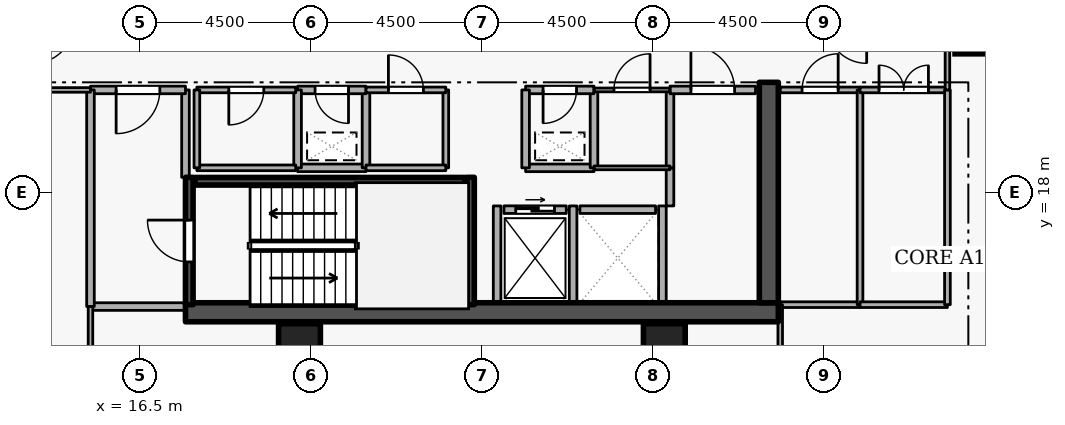
"""IFC4 building model, lengths in metres.
Left out: names, types, materials, properties, quantities, classifications, styles, units other than length and angle.
Written with IfcOpenShell. Run it as: python <this file> out.ifc"""

import sys

from ifc_helpers import new_model, si_unit, direction, frame, frame_2d, origin, origin_2d, place, context, subcontext, project, spatial, rectangle, extrude, element, fill, save


model = new_model("IFC4")
c1 = context("Model", 3, precision=1e-05, world=origin(), true_north=direction((0.0, 1.0)))
c2 = subcontext(c1, "Body", "Model", "MODEL_VIEW")
j1 = project(units=[si_unit("LENGTHUNIT", "METRE"), si_unit("PLANEANGLEUNIT", "RADIAN")], contexts=[c1])
p1 = place(None, origin())
s1 = spatial("IfcSite", under=j1, at=p1, CompositionType="ELEMENT")
p2 = place(p1, origin())
s2 = spatial("IfcBuilding", under=s1, at=p2, CompositionType="ELEMENT")
p3 = place(p2, frame((0.0, 0.0, 163.5)))
s3 = spatial("IfcBuildingStorey", under=s2, at=p3, CompositionType="ELEMENT", Elevation=163.5)
p4 = place(p3, frame((17.7, 14.85, 0.0), z_axis=(0.0, 0.0, 1.0), x_axis=(1.0, 0.0, 0.0)))
e1 = element("IfcWall", 1, at=p4, inside=s3, PredefinedType="SHEAR", context=c2, shape_type="SweptSolid", body=[
    extrude(rectangle(XDim=15.6, YDim=0.5, at=frame_2d((7.8, 0.0))), origin(), (0.0, 0.0, 1.0), 3.6),
])
p5 = place(p3, frame((33.05, 15.1, 0.0), z_axis=(0.0, 0.0, 1.0), x_axis=(0.0, 1.0, 0.0)))
e2 = element("IfcWall", 2, at=p5, inside=s3, PredefinedType="SHEAR", context=c2, shape_type="SweptSolid", body=[
    extrude(rectangle(XDim=5.8, YDim=0.5, at=frame_2d((2.9, 0.0))), origin(), (0.0, 0.0, 1.0), 3.6),
])
for number, where, z_axis, x_axis in (
    (3, (38.5, 22.2, 0.0), (0.0, 0.0, 1.0), (1.0, 0.0, 0.0)),
    (4, (20.7, 14.0, 0.0), (0.0, 0.0, 1.0), (1.0, 0.0, 0.0)),
    (5, (30.3, 14.0, 0.0), (0.0, 0.0, 1.0), (1.0, 0.0, 0.0)),
):
    element("IfcColumn", number, at=place(p3, frame(where, z_axis=z_axis, x_axis=x_axis)), inside=s3, PredefinedType="COLUMN", context=c2, shape_type="SweptSolid", body=[
        extrude(rectangle(XDim=1.1, YDim=1.1, at=origin_2d()), origin(), (0.0, 0.0, 1.0), 3.6),
    ])
p6 = place(p3, frame((26.08, 17.55, 0.0), z_axis=(0.0, 0.0, 1.0), x_axis=(1.0, 0.0, 0.0)))
e6 = element("IfcWall", 6, at=p6, inside=s3, PredefinedType="STANDARD", context=c2, shape_type="SweptSolid", body=[
    extrude(rectangle(XDim=1.64, YDim=0.2, at=frame_2d((0.82, 0.0))), origin(), (0.0, 0.0, 1.0), 3.34),
])
p7 = place(p6, frame((0.31, 0.0, 0.0)))
e7 = element("IfcOpeningElement", 7, at=p7, cuts=e6, PredefinedType="OPENING", context=c2, shape_type="SweptSolid", body=[
    extrude(rectangle(XDim=1.02, YDim=2.06, at=frame_2d((0.51, 1.03))), frame((0.0, 0.11, 0.0), z_axis=(0.0, -1.0, 0.0), x_axis=(1.0, 0.0, 0.0)), (0.0, 0.0, 1.0), 0.22),
])
p8 = place(p3, frame((28.08, 17.55, 0.0), z_axis=(0.0, 0.0, 1.0), x_axis=(1.0, 0.0, 0.0)))
e8 = element("IfcWall", 8, at=p8, inside=s3, PredefinedType="STANDARD", context=c2, shape_type="SweptSolid", body=[
    extrude(rectangle(XDim=1.99, YDim=0.2, at=frame_2d((0.995, 0.0))), origin(), (0.0, 0.0, 1.0), 3.34),
])
for number, where, z_axis, x_axis in (
    (9, (27.9, 15.112, 0.0), (0.0, 0.0, 1.0), (0.0, 1.0, 0.0)),
    (10, (25.9, 15.112, 0.0), (0.0, 0.0, 1.0), (0.0, 1.0, 0.0)),
    (11, (30.25, 15.112, 0.0), (0.0, 0.0, 1.0), (0.0, 1.0, 0.0)),
):
    element("IfcWall", number, at=place(p3, frame(where, z_axis=z_axis, x_axis=x_axis)), inside=s3, PredefinedType="STANDARD", context=c2, shape_type="SweptSolid", body=[
        extrude(rectangle(XDim=2.536, YDim=0.2, at=frame_2d((1.268, 0.0))), origin(), (0.0, 0.0, 1.0), 3.34),
    ])
p9 = place(p3, frame((17.8, 15.05, 0.0), z_axis=(0.0, 0.0, 1.0), x_axis=(0.0, 1.0, 0.0)))
e12 = element("IfcWall", 12, at=p9, inside=s3, PredefinedType="SHEAR", context=c2, shape_type="SweptSolid", body=[
    extrude(rectangle(XDim=3.35, YDim=0.2, at=frame_2d((1.675, 0.0))), origin(), (0.0, 0.0, 1.0), 3.6),
])
p10 = place(p9, frame((1.125, 0.0, 0.0)))
e13 = element("IfcOpeningElement", 13, at=p10, cuts=e12, PredefinedType="OPENING", context=c2, shape_type="SweptSolid", body=[
    extrude(rectangle(XDim=1.1, YDim=2.1, at=frame_2d((0.55, 1.05))), frame((0.0, 0.11, 0.0), z_axis=(0.0, -1.0, 0.0), x_axis=(1.0, 0.0, 0.0)), (0.0, 0.0, 1.0), 0.22),
])
p11 = place(p3, frame((25.2, 18.4, 0.0), z_axis=(0.0, 0.0, 1.0), x_axis=(0.0, -1.0, 0.0)))
e14 = element("IfcWall", 14, at=p11, inside=s3, PredefinedType="SHEAR", context=c2, shape_type="SweptSolid", body=[
    extrude(rectangle(XDim=3.35, YDim=0.2, at=frame_2d((1.675, 0.0))), origin(), (0.0, 0.0, 1.0), 3.6),
])
p12 = place(p3, frame((25.05, 18.297, 0.0), z_axis=(0.0, 0.0, 1.0), x_axis=(-1.0, 0.0, 0.0)))
e15 = element("IfcWall", 15, at=p12, inside=s3, PredefinedType="SHEAR", context=c2, shape_type="SweptSolid", body=[
    extrude(rectangle(XDim=7.1, YDim=0.2, at=frame_2d((3.55, 0.0))), origin(), (0.0, 0.0, 1.0), 3.6),
])
p13 = place(p3, frame((15.2, 15.0, 0.0), z_axis=(0.0, 0.0, 1.0), x_axis=(1.0, 0.0, 0.0)))
e16 = element("IfcWall", 16, at=p13, inside=s3, PredefinedType="STANDARD", context=c2, shape_type="SweptSolid", body=[
    extrude(rectangle(XDim=2.5, YDim=0.2, at=frame_2d((1.25, 0.0))), origin(), (0.0, 0.0, 1.0), 3.34),
])
p14 = place(p3, frame((17.7, 18.4, 0.0), z_axis=(0.0, 0.0, 1.0), x_axis=(0.0, 1.0, 0.0)))
e17 = element("IfcWall", 17, at=p14, inside=s3, PredefinedType="STANDARD", context=c2, shape_type="SweptSolid", body=[
    extrude(rectangle(XDim=2.3, YDim=0.2, at=frame_2d((1.15, 0.0))), origin(), (0.0, 0.0, 1.0), 2.545),
])
p15 = place(p3, frame((17.7, 20.7, 0.0), z_axis=(0.0, 0.0, 1.0), x_axis=(-1.0, 0.0, 0.0)))
e18 = element("IfcWall", 18, at=p15, inside=s3, PredefinedType="STANDARD", context=c2, shape_type="SweptSolid", body=[
    extrude(rectangle(XDim=2.5, YDim=0.2, at=frame_2d((1.25, 0.0))), origin(), (0.0, 0.0, 1.0), 3.34),
])
p16 = place(p15, frame((0.675, 0.0, 0.0)))
e19 = element("IfcOpeningElement", 19, at=p16, cuts=e18, PredefinedType="OPENING", context=c2, shape_type="SweptSolid", body=[
    extrude(rectangle(XDim=1.15, YDim=2.1, at=frame_2d((0.575, 1.05))), frame((0.0, 0.11, 0.0), z_axis=(0.0, -1.0, 0.0), x_axis=(1.0, 0.0, 0.0)), (0.0, 0.0, 1.0), 0.22),
])
p17 = place(p3, frame((15.2, 20.7, 0.0), z_axis=(0.0, 0.0, 1.0), x_axis=(0.0, -1.0, 0.0)))
e20 = element("IfcWall", 20, at=p17, inside=s3, PredefinedType="STANDARD", context=c2, shape_type="SweptSolid", body=[
    extrude(rectangle(XDim=5.7, YDim=0.2, at=frame_2d((2.85, 0.0))), origin(), (0.0, 0.0, 1.0), 3.34),
])
p18 = place(p3, frame((26.65, 18.65, 0.0), z_axis=(0.0, 0.0, 1.0), x_axis=(1.0, 0.0, 0.0)))
e21 = element("IfcWall", 21, at=p18, inside=s3, PredefinedType="STANDARD", context=c2, shape_type="SweptSolid", body=[
    extrude(rectangle(XDim=1.8, YDim=0.2, at=frame_2d((0.9, 0.0))), origin(), (0.0, 0.0, 1.0), 3.34),
])
p19 = place(p3, frame((28.45, 18.65, 0.0), z_axis=(0.0, 0.0, 1.0), x_axis=(0.0, 1.0, 0.0)))
e22 = element("IfcWall", 22, at=p19, inside=s3, PredefinedType="STANDARD", context=c2, shape_type="SweptSolid", body=[
    extrude(rectangle(XDim=2.05, YDim=0.2, at=frame_2d((1.025, 0.0))), origin(), (0.0, 0.0, 1.0), 3.34),
])
p20 = place(p3, frame((28.45, 20.7, 0.0), z_axis=(0.0, 0.0, 1.0), x_axis=(-1.0, 0.0, 0.0)))
e23 = element("IfcWall", 23, at=p20, inside=s3, PredefinedType="STANDARD", context=c2, shape_type="SweptSolid", body=[
    extrude(rectangle(XDim=1.8, YDim=0.2, at=frame_2d((0.9, 0.0))), origin(), (0.0, 0.0, 1.0), 3.34),
])
p21 = place(p20, frame((0.46, 0.0, 0.0)))
e24 = element("IfcOpeningElement", 24, at=p21, cuts=e23, PredefinedType="OPENING", context=c2, shape_type="SweptSolid", body=[
    extrude(rectangle(XDim=0.88, YDim=2.04, at=frame_2d((0.44, 1.02))), frame((0.0, 0.11, 0.0), z_axis=(0.0, -1.0, 0.0), x_axis=(1.0, 0.0, 0.0)), (0.0, 0.0, 1.0), 0.22),
])
p22 = place(p3, frame((26.65, 20.7, 0.0), z_axis=(0.0, 0.0, 1.0), x_axis=(0.0, -1.0, 0.0)))
e25 = element("IfcWall", 25, at=p22, inside=s3, PredefinedType="STANDARD", context=c2, shape_type="SweptSolid", body=[
    extrude(rectangle(XDim=2.05, YDim=0.2, at=frame_2d((1.025, 0.0))), origin(), (0.0, 0.0, 1.0), 3.34),
])
p23 = place(p3, frame((20.65, 18.65, 0.0), z_axis=(0.0, 0.0, 1.0), x_axis=(1.0, 0.0, 0.0)))
e26 = element("IfcWall", 26, at=p23, inside=s3, PredefinedType="STANDARD", context=c2, shape_type="SweptSolid", body=[
    extrude(rectangle(XDim=1.8, YDim=0.2, at=frame_2d((0.9, 0.0))), origin(), (0.0, 0.0, 1.0), 3.34),
])
p24 = place(p3, frame((22.45, 18.65, 0.0), z_axis=(0.0, 0.0, 1.0), x_axis=(0.0, 1.0, 0.0)))
e27 = element("IfcWall", 27, at=p24, inside=s3, PredefinedType="STANDARD", context=c2, shape_type="SweptSolid", body=[
    extrude(rectangle(XDim=2.05, YDim=0.2, at=frame_2d((1.025, 0.0))), origin(), (0.0, 0.0, 1.0), 3.34),
])
p25 = place(p3, frame((22.45, 20.7, 0.0), z_axis=(0.0, 0.0, 1.0), x_axis=(-1.0, 0.0, 0.0)))
e28 = element("IfcWall", 28, at=p25, inside=s3, PredefinedType="STANDARD", context=c2, shape_type="SweptSolid", body=[
    extrude(rectangle(XDim=1.8, YDim=0.2, at=frame_2d((0.9, 0.0))), origin(), (0.0, 0.0, 1.0), 3.34),
])
p26 = place(p25, frame((0.46, 0.0, 0.0)))
e29 = element("IfcOpeningElement", 29, at=p26, cuts=e28, PredefinedType="OPENING", context=c2, shape_type="SweptSolid", body=[
    extrude(rectangle(XDim=0.88, YDim=2.04, at=frame_2d((0.44, 1.02))), frame((0.0, 0.11, 0.0), z_axis=(0.0, -1.0, 0.0), x_axis=(1.0, 0.0, 0.0)), (0.0, 0.0, 1.0), 0.22),
])
p27 = place(p3, frame((20.65, 20.7, 0.0), z_axis=(0.0, 0.0, 1.0), x_axis=(0.0, -1.0, 0.0)))
e30 = element("IfcWall", 30, at=p27, inside=s3, PredefinedType="STANDARD", context=c2, shape_type="SweptSolid", body=[
    extrude(rectangle(XDim=2.05, YDim=0.2, at=frame_2d((1.025, 0.0))), origin(), (0.0, 0.0, 1.0), 3.34),
])
p28 = place(p3, frame((30.45, 17.648, 0.0), z_axis=(0.0, 0.0, 1.0), x_axis=(0.0, 1.0, 0.0)))
e31 = element("IfcWall", 31, at=p28, inside=s3, PredefinedType="STANDARD", context=c2, shape_type="SweptSolid", body=[
    extrude(rectangle(XDim=1.002, YDim=0.2, at=frame_2d((0.501, 0.0))), origin(), (0.0, 0.0, 1.0), 3.34),
])
p29 = place(p3, frame((30.45, 18.65, 0.0), z_axis=(0.0, 0.0, 1.0), x_axis=(0.0, 1.0, 0.0)))
e32 = element("IfcWall", 32, at=p29, inside=s3, PredefinedType="STANDARD", context=c2, shape_type="SweptSolid", body=[
    extrude(rectangle(XDim=2.05, YDim=0.2, at=frame_2d((1.025, 0.0))), origin(), (0.0, 0.0, 1.0), 3.34),
])
p30 = place(p3, frame((30.45, 20.7, 0.0), z_axis=(0.0, 0.0, 1.0), x_axis=(1.0, 0.0, 0.0)))
e33 = element("IfcWall", 33, at=p30, inside=s3, PredefinedType="STANDARD", context=c2, shape_type="SweptSolid", body=[
    extrude(rectangle(XDim=2.25, YDim=0.2, at=frame_2d((1.125, 0.0))), origin(), (0.0, 0.0, 1.0), 3.34),
])
p31 = place(p30, frame((0.55, 0.0, 0.0)))
e34 = element("IfcOpeningElement", 34, at=p31, cuts=e33, PredefinedType="OPENING", context=c2, shape_type="SweptSolid", body=[
    extrude(rectangle(XDim=1.15, YDim=2.1, at=frame_2d((0.575, 1.05))), frame((0.0, 0.11, 0.0), z_axis=(0.0, -1.0, 0.0), x_axis=(1.0, 0.0, 0.0)), (0.0, 0.0, 1.0), 0.22),
])
p32 = place(p3, frame((18.0, 18.65, 0.0), z_axis=(0.0, 0.0, 1.0), x_axis=(1.0, 0.0, 0.0)))
e35 = element("IfcWall", 35, at=p32, inside=s3, PredefinedType="PARTITIONING", context=c2, shape_type="SweptSolid", body=[
    extrude(rectangle(XDim=2.6, YDim=0.15, at=frame_2d((1.3, 0.0))), origin(), (0.0, 0.0, 1.0), 3.34),
])
p33 = place(p3, frame((20.6, 20.7, 0.0), z_axis=(0.0, 0.0, 1.0), x_axis=(-1.0, 0.0, 0.0)))
e36 = element("IfcWall", 36, at=p33, inside=s3, PredefinedType="PARTITIONING", context=c2, shape_type="SweptSolid", body=[
    extrude(rectangle(XDim=2.6, YDim=0.15, at=frame_2d((1.3, 0.0))), origin(), (0.0, 0.0, 1.0), 3.34),
])
p34 = place(p33, frame((0.84, 0.0, 0.0)))
e37 = element("IfcOpeningElement", 37, at=p34, cuts=e36, PredefinedType="OPENING", context=c2, shape_type="SweptSolid", body=[
    extrude(rectangle(XDim=0.92, YDim=2.08, at=frame_2d((0.46, 1.04))), frame((0.0, 0.085, 0.0), z_axis=(0.0, -1.0, 0.0), x_axis=(1.0, 0.0, 0.0)), (0.0, 0.0, 1.0), 0.17),
])
p35 = place(p3, frame((18.0, 20.7, 0.0), z_axis=(0.0, 0.0, 1.0), x_axis=(0.0, -1.0, 0.0)))
e38 = element("IfcWall", 38, at=p35, inside=s3, PredefinedType="PARTITIONING", context=c2, shape_type="SweptSolid", body=[
    extrude(rectangle(XDim=2.05, YDim=0.15, at=frame_2d((1.025, 0.0))), origin(), (0.0, 0.0, 1.0), 2.545),
])
p36 = place(p3, frame((24.55, 20.7, 0.0), z_axis=(0.0, 0.0, 1.0), x_axis=(0.0, -1.0, 0.0)))
e39 = element("IfcWall", 39, at=p36, inside=s3, PredefinedType="PARTITIONING", context=c2, shape_type="SweptSolid", body=[
    extrude(rectangle(XDim=2.05, YDim=0.15, at=frame_2d((1.025, 0.0))), origin(), (0.0, 0.0, 1.0), 3.34),
])
p37 = place(p3, frame((24.55, 18.65, 0.0), z_axis=(0.0, 0.0, 1.0), x_axis=(-1.0, 0.0, 0.0)))
e40 = element("IfcWall", 40, at=p37, inside=s3, PredefinedType="PARTITIONING", context=c2, shape_type="SweptSolid", body=[
    extrude(rectangle(XDim=2.1, YDim=0.15, at=frame_2d((1.05, 0.0))), origin(), (0.0, 0.0, 1.0), 3.34),
])
p38 = place(p3, frame((22.45, 20.7, 0.0), z_axis=(0.0, 0.0, 1.0), x_axis=(1.0, 0.0, 0.0)))
e41 = element("IfcWall", 41, at=p38, inside=s3, PredefinedType="PARTITIONING", context=c2, shape_type="SweptSolid", body=[
    extrude(rectangle(XDim=2.1, YDim=0.15, at=frame_2d((1.05, 0.0))), origin(), (0.0, 0.0, 1.0), 3.34),
])
p39 = place(p38, frame((0.59, 0.0, 0.0)))
e42 = element("IfcOpeningElement", 42, at=p39, cuts=e41, PredefinedType="OPENING", context=c2, shape_type="SweptSolid", body=[
    extrude(rectangle(XDim=0.92, YDim=2.08, at=frame_2d((0.46, 1.04))), frame((0.0, 0.085, 0.0), z_axis=(0.0, -1.0, 0.0), x_axis=(1.0, 0.0, 0.0)), (0.0, 0.0, 1.0), 0.17),
])
p40 = place(p3, frame((30.45, 18.65, 0.0), z_axis=(0.0, 0.0, 1.0), x_axis=(-1.0, 0.0, 0.0)))
e43 = element("IfcWall", 43, at=p40, inside=s3, PredefinedType="PARTITIONING", context=c2, shape_type="SweptSolid", body=[
    extrude(rectangle(XDim=2.0, YDim=0.1, at=frame_2d((1.0, 0.0))), origin(), (0.0, 0.0, 1.0), 3.34),
])
p41 = place(p3, frame((28.45, 20.7, 0.0), z_axis=(0.0, 0.0, 1.0), x_axis=(1.0, 0.0, 0.0)))
e44 = element("IfcWall", 44, at=p41, inside=s3, PredefinedType="PARTITIONING", context=c2, shape_type="SweptSolid", body=[
    extrude(rectangle(XDim=2.0, YDim=0.1, at=frame_2d((1.0, 0.0))), origin(), (0.0, 0.0, 1.0), 3.34),
])
p42 = place(p41, frame((0.525, 0.0, 0.0)))
e45 = element("IfcOpeningElement", 45, at=p42, cuts=e44, PredefinedType="OPENING", context=c2, shape_type="SweptSolid", body=[
    extrude(rectangle(XDim=0.95, YDim=2.1, at=frame_2d((0.475, 1.05))), frame((0.0, 0.06, 0.0), z_axis=(0.0, -1.0, 0.0), x_axis=(1.0, 0.0, 0.0)), (0.0, 0.0, 1.0), 0.12),
])
p43 = place(p3, frame((35.45, 15.05, 0.0), z_axis=(0.0, 0.0, 1.0), x_axis=(-1.0, 0.0, 0.0)))
e46 = element("IfcWall", 46, at=p43, inside=s3, PredefinedType="PARTITIONING", context=c2, shape_type="SweptSolid", body=[
    extrude(rectangle(XDim=2.1, YDim=0.15, at=frame_2d((1.05, 0.0))), origin(), (0.0, 0.0, 1.0), 3.34),
])
p44 = place(p3, frame((33.35, 20.7, 0.0), z_axis=(0.0, 0.0, 1.0), x_axis=(1.0, 0.0, 0.0)))
e47 = element("IfcWall", 47, at=p44, inside=s3, PredefinedType="PARTITIONING", context=c2, shape_type="SweptSolid", body=[
    extrude(rectangle(XDim=2.1, YDim=0.15, at=frame_2d((1.05, 0.0))), origin(), (0.0, 0.0, 1.0), 3.34),
])
p45 = place(p44, frame((0.575, 0.0, 0.0)))
e48 = element("IfcOpeningElement", 48, at=p45, cuts=e47, PredefinedType="OPENING", context=c2, shape_type="SweptSolid", body=[
    extrude(rectangle(XDim=0.95, YDim=2.1, at=frame_2d((0.475, 1.05))), frame((0.0, 0.085, 0.0), z_axis=(0.0, -1.0, 0.0), x_axis=(1.0, 0.0, 0.0)), (0.0, 0.0, 1.0), 0.17),
])
p46 = place(p3, frame((35.45, 20.7, 0.0), z_axis=(0.0, 0.0, 1.0), x_axis=(0.0, -1.0, 0.0)))
e49 = element("IfcWall", 49, at=p46, inside=s3, PredefinedType="PARTITIONING", context=c2, shape_type="SweptSolid", body=[
    extrude(rectangle(XDim=5.65, YDim=0.15, at=frame_2d((2.825, 0.0))), origin(), (0.0, 0.0, 1.0), 3.34),
])
p47 = place(p3, frame((37.75, 15.05, 0.0), z_axis=(0.0, 0.0, 1.0), x_axis=(-1.0, 0.0, 0.0)))
e50 = element("IfcWall", 50, at=p47, inside=s3, PredefinedType="PARTITIONING", context=c2, shape_type="SweptSolid", body=[
    extrude(rectangle(XDim=2.3, YDim=0.15, at=frame_2d((1.15, 0.0))), origin(), (0.0, 0.0, 1.0), 3.34),
])
p48 = place(p3, frame((35.45, 20.7, 0.0), z_axis=(0.0, 0.0, 1.0), x_axis=(1.0, 0.0, 0.0)))
e51 = element("IfcWall", 51, at=p48, inside=s3, PredefinedType="PARTITIONING", context=c2, shape_type="SweptSolid", body=[
    extrude(rectangle(XDim=2.3, YDim=0.15, at=frame_2d((1.15, 0.0))), origin(), (0.0, 0.0, 1.0), 3.34),
])
p49 = place(p48, frame((0.5, 0.0, 0.0)))
e52 = element("IfcOpeningElement", 52, at=p49, cuts=e51, PredefinedType="OPENING", context=c2, shape_type="SweptSolid", body=[
    extrude(rectangle(XDim=1.3, YDim=2.12, at=frame_2d((0.65, 1.06))), frame((0.0, 0.085, 0.0), z_axis=(0.0, -1.0, 0.0), x_axis=(1.0, 0.0, 0.0)), (0.0, 0.0, 1.0), 0.17),
])
p50 = place(p3, frame((37.75, 20.7, 0.0), z_axis=(0.0, 0.0, 1.0), x_axis=(0.0, -1.0, 0.0)))
e53 = element("IfcWall", 53, at=p50, inside=s3, PredefinedType="PARTITIONING", context=c2, shape_type="SweptSolid", body=[
    extrude(rectangle(XDim=5.65, YDim=0.15, at=frame_2d((2.825, 0.0))), origin(), (0.0, 0.0, 1.0), 3.34),
])
p51 = place(p3, frame((13.25, 20.7, 0.0), z_axis=(0.0, 0.0, 1.0), x_axis=(1.0, 0.0, 0.0)))
e54 = element("IfcWall", 54, at=p51, inside=s3, PredefinedType="PARTITIONING", context=c2, shape_type="SweptSolid", body=[
    extrude(rectangle(XDim=1.95, YDim=0.12, at=frame_2d((0.975, 0.0))), origin(), (0.0, 0.0, 1.0), 3.34),
])
p52 = place(p3, frame((15.2, 15.0, 0.0), z_axis=(0.0, 0.0, 1.0), x_axis=(0.0, -1.0, 0.0)))
e55 = element("IfcWall", 55, at=p52, inside=s3, PredefinedType="PARTITIONING", context=c2, shape_type="SweptSolid", body=[
    extrude(rectangle(XDim=11.72, YDim=0.12, at=frame_2d((5.86, 0.0))), origin(), (0.0, 0.0, 1.0), 3.34),
])
p53 = place(p3, frame((33.35, 3.28, 0.0), z_axis=(0.0, 0.0, 1.0), x_axis=(0.0, 1.0, 0.0)))
e56 = element("IfcWall", 56, at=p53, inside=s3, PredefinedType="PARTITIONING", context=c2, shape_type="SweptSolid", body=[
    extrude(rectangle(XDim=11.77, YDim=0.12, at=frame_2d((5.885, 0.0))), origin(), (0.0, 0.0, 1.0), 2.545),
])
p54 = place(p3, frame((37.75, 20.7, 0.0), z_axis=(0.0, 0.0, 1.0), x_axis=(0.0, 1.0, 0.0)))
e57 = element("IfcWall", 57, at=p54, inside=s3, PredefinedType="PARTITIONING", context=c2, shape_type="SweptSolid", body=[
    extrude(rectangle(XDim=1.75, YDim=0.12, at=frame_2d((0.875, 0.0))), origin(), (0.0, 0.0, 1.0), 3.34),
])
p55 = place(p7, origin())
e58 = element("IfcDoor", 58, at=p55, inside=s3, OperationType="SLIDING_TO_LEFT", PredefinedType="DOOR", context=c2, shape_type="SweptSolid", body=[
    extrude(rectangle(XDim=1.02, YDim=2.06, at=frame_2d((0.51, 1.03))), frame((0.0, 0.025, 0.0), z_axis=(0.0, -1.0, 0.0), x_axis=(1.0, 0.0, 0.0)), (0.0, 0.0, 1.0), 0.05),
])
fill(e7, e58)
p56 = place(p10, origin())
e59 = element("IfcDoor", 59, at=p56, inside=s3, OperationType="SINGLE_SWING_RIGHT", PredefinedType="DOOR", context=c2, shape_type="SweptSolid", body=[
    extrude(rectangle(XDim=1.1, YDim=2.1, at=frame_2d((0.55, 1.05))), frame((0.0, 0.025, 0.0), z_axis=(0.0, -1.0, 0.0), x_axis=(1.0, 0.0, 0.0)), (0.0, 0.0, 1.0), 0.05),
])
fill(e13, e59)
p57 = place(p16, origin())
e60 = element("IfcDoor", 60, at=p57, inside=s3, OperationType="SINGLE_SWING_RIGHT", PredefinedType="DOOR", context=c2, shape_type="SweptSolid", body=[
    extrude(rectangle(XDim=1.15, YDim=2.1, at=frame_2d((0.575, 1.05))), frame((0.0, 0.025, 0.0), z_axis=(0.0, -1.0, 0.0), x_axis=(1.0, 0.0, 0.0)), (0.0, 0.0, 1.0), 0.05),
])
fill(e19, e60)
p58 = place(p21, origin())
e61 = element("IfcDoor", 61, at=p58, inside=s3, OperationType="SINGLE_SWING_RIGHT", PredefinedType="DOOR", context=c2, shape_type="SweptSolid", body=[
    extrude(rectangle(XDim=0.88, YDim=2.04, at=frame_2d((0.44, 1.02))), frame((0.0, 0.025, 0.0), z_axis=(0.0, -1.0, 0.0), x_axis=(1.0, 0.0, 0.0)), (0.0, 0.0, 1.0), 0.05),
])
fill(e24, e61)
p59 = place(p26, origin())
e62 = element("IfcDoor", 62, at=p59, inside=s3, OperationType="SINGLE_SWING_LEFT", PredefinedType="DOOR", context=c2, shape_type="SweptSolid", body=[
    extrude(rectangle(XDim=0.88, YDim=2.04, at=frame_2d((0.44, 1.02))), frame((0.0, 0.025, 0.0), z_axis=(0.0, -1.0, 0.0), x_axis=(1.0, 0.0, 0.0)), (0.0, 0.0, 1.0), 0.05),
])
fill(e29, e62)
p60 = place(p34, origin())
e63 = element("IfcDoor", 63, at=p60, inside=s3, OperationType="SINGLE_SWING_RIGHT", PredefinedType="DOOR", context=c2, shape_type="SweptSolid", body=[
    extrude(rectangle(XDim=0.92, YDim=2.08, at=frame_2d((0.46, 1.04))), frame((0.0, 0.025, 0.0), z_axis=(0.0, -1.0, 0.0), x_axis=(1.0, 0.0, 0.0)), (0.0, 0.0, 1.0), 0.05),
])
fill(e37, e63)
p61 = place(p39, origin())
e64 = element("IfcDoor", 64, at=p61, inside=s3, OperationType="SINGLE_SWING_LEFT", PredefinedType="DOOR", context=c2, shape_type="SweptSolid", body=[
    extrude(rectangle(XDim=0.92, YDim=2.08, at=frame_2d((0.46, 1.04))), frame((0.0, 0.025, 0.0), z_axis=(0.0, -1.0, 0.0), x_axis=(1.0, 0.0, 0.0)), (0.0, 0.0, 1.0), 0.05),
])
fill(e42, e64)
p62 = place(p42, origin())
e65 = element("IfcDoor", 65, at=p62, inside=s3, OperationType="SINGLE_SWING_RIGHT", PredefinedType="DOOR", context=c2, shape_type="SweptSolid", body=[
    extrude(rectangle(XDim=0.95, YDim=2.1, at=frame_2d((0.475, 1.05))), frame((0.0, 0.025, 0.0), z_axis=(0.0, -1.0, 0.0), x_axis=(1.0, 0.0, 0.0)), (0.0, 0.0, 1.0), 0.05),
])
fill(e45, e65)
p63 = place(p31, origin())
e66 = element("IfcDoor", 66, at=p63, inside=s3, OperationType="SINGLE_SWING_LEFT", PredefinedType="DOOR", context=c2, shape_type="SweptSolid", body=[
    extrude(rectangle(XDim=1.15, YDim=2.1, at=frame_2d((0.575, 1.05))), frame((0.0, 0.025, 0.0), z_axis=(0.0, -1.0, 0.0), x_axis=(1.0, 0.0, 0.0)), (0.0, 0.0, 1.0), 0.05),
])
fill(e34, e66)
p64 = place(p45, origin())
e67 = element("IfcDoor", 67, at=p64, inside=s3, OperationType="SINGLE_SWING_RIGHT", PredefinedType="DOOR", context=c2, shape_type="SweptSolid", body=[
    extrude(rectangle(XDim=0.95, YDim=2.1, at=frame_2d((0.475, 1.05))), frame((0.0, 0.025, 0.0), z_axis=(0.0, -1.0, 0.0), x_axis=(1.0, 0.0, 0.0)), (0.0, 0.0, 1.0), 0.05),
])
fill(e48, e67)
p65 = place(p49, origin())
e68 = element("IfcDoor", 68, at=p65, inside=s3, OperationType="DOUBLE_DOOR_SINGLE_SWING", PredefinedType="DOOR", context=c2, shape_type="SweptSolid", body=[
    extrude(rectangle(XDim=1.3, YDim=2.12, at=frame_2d((0.65, 1.06))), frame((0.0, 0.025, 0.0), z_axis=(0.0, -1.0, 0.0), x_axis=(1.0, 0.0, 0.0)), (0.0, 0.0, 1.0), 0.05),
])
fill(e52, e68)
save(model, sys.argv[1])
